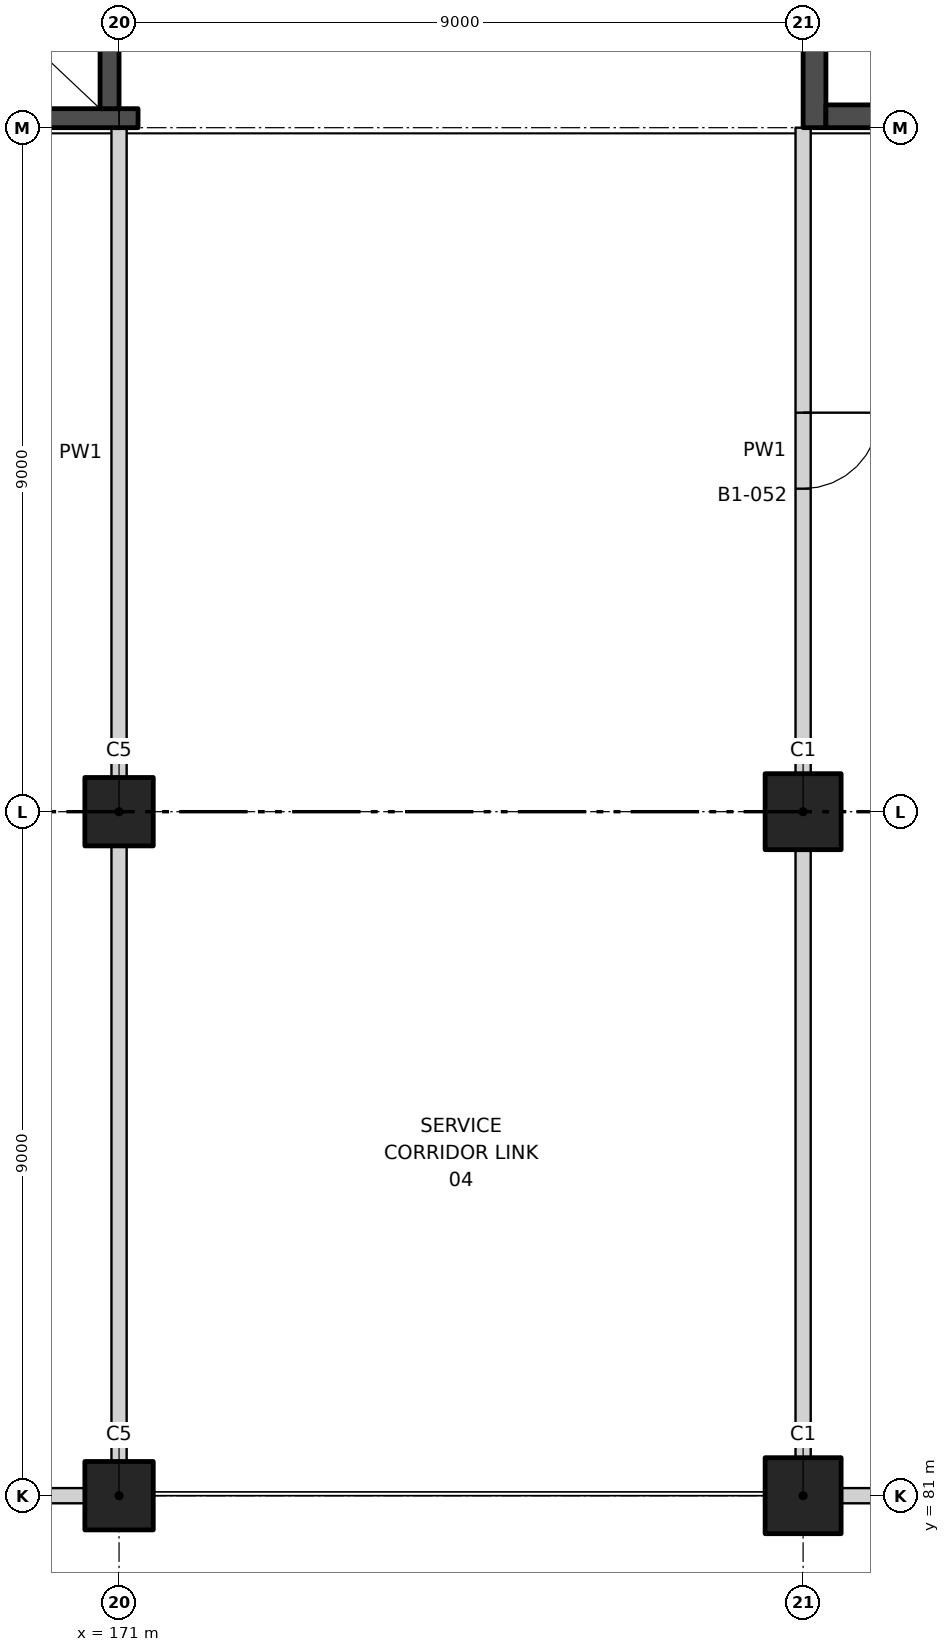
"""IFC4 building model, lengths in metres.
Left out: names, types, materials, properties, quantities, classifications, styles, units other than length and angle.
Written with IfcOpenShell. Run it as: python <this file> out.ifc"""

import sys

from ifc_helpers import new_model, si_unit, direction, frame, frame_2d, origin, origin_2d, place, context, subcontext, project, spatial, rectangle, extrude, element, fill, save


model = new_model("IFC4")
c1 = context("Model", 3, precision=1e-05, world=origin(), true_north=direction((0.0, 1.0)))
c2 = subcontext(c1, "Body", "Model", "MODEL_VIEW")
j1 = project(units=[si_unit("LENGTHUNIT", "METRE"), si_unit("PLANEANGLEUNIT", "RADIAN")], contexts=[c1])
p1 = place(None, origin())
s1 = spatial("IfcSite", under=j1, at=p1, CompositionType="ELEMENT")
p2 = place(p1, origin())
s2 = spatial("IfcBuilding", under=s1, at=p2, CompositionType="ELEMENT")
p3 = place(p2, frame((0.0, 0.0, -6.0)))
s3 = spatial("IfcBuildingStorey", under=s2, at=p3, CompositionType="ELEMENT", Elevation=-6.0)
p4 = place(p3, frame((171.0, 81.0, 0.0), z_axis=(0.0, 0.0, 1.0), x_axis=(1.0, 0.0, 0.0)))
e1 = element("IfcColumn", 1, at=p4, inside=s3, PredefinedType="COLUMN", context=c2, shape_type="SweptSolid", body=[
    extrude(rectangle(XDim=0.9, YDim=0.9, at=origin_2d()), origin(), (0.0, 0.0, 1.0), 6.0),
])
p5 = place(p3, frame((180.0, 81.0, 0.0), z_axis=(0.0, 0.0, 1.0), x_axis=(1.0, 0.0, 0.0)))
e2 = element("IfcColumn", 2, at=p5, inside=s3, PredefinedType="COLUMN", context=c2, shape_type="SweptSolid", body=[
    extrude(rectangle(XDim=1.0, YDim=1.0, at=origin_2d()), origin(), (0.0, 0.0, 1.0), 6.0),
])
p6 = place(p3, frame((171.0, 90.0, 0.0), z_axis=(0.0, 0.0, 1.0), x_axis=(1.0, 0.0, 0.0)))
e3 = element("IfcColumn", 3, at=p6, inside=s3, PredefinedType="COLUMN", context=c2, shape_type="SweptSolid", body=[
    extrude(rectangle(XDim=0.9, YDim=0.9, at=origin_2d()), origin(), (0.0, 0.0, 1.0), 6.0),
])
p7 = place(p3, frame((180.0, 90.0, 0.0), z_axis=(0.0, 0.0, 1.0), x_axis=(1.0, 0.0, 0.0)))
e4 = element("IfcColumn", 4, at=p7, inside=s3, PredefinedType="COLUMN", context=c2, shape_type="SweptSolid", body=[
    extrude(rectangle(XDim=1.0, YDim=1.0, at=origin_2d()), origin(), (0.0, 0.0, 1.0), 6.0),
])
p8 = place(p3, frame((164.25, 81.0, 0.0), z_axis=(0.0, 0.0, 1.0), x_axis=(1.0, 0.0, 0.0)))
e5 = element("IfcWall", 5, at=p8, inside=s3, PredefinedType="PARTITIONING", context=c2, shape_type="SweptSolid", body=[
    extrude(rectangle(XDim=6.3, YDim=0.2, at=frame_2d((3.15, 0.0))), origin(), (0.0, 0.0, 1.0), 4.85),
])
p9 = place(p8, frame((4.25, 0.0, 0.0)))
e6 = element("IfcOpeningElement", 6, at=p9, cuts=e5, PredefinedType="OPENING", context=c2, shape_type="SweptSolid", body=[
    extrude(rectangle(XDim=1.0, YDim=2.1, at=frame_2d((0.5, 1.05))), frame((0.0, 0.11, 0.0), z_axis=(0.0, -1.0, 0.0), x_axis=(1.0, 0.0, 0.0)), (0.0, 0.0, 1.0), 0.22),
])
p10 = place(p3, frame((180.5, 81.0, 0.0), z_axis=(0.0, 0.0, 1.0), x_axis=(1.0, 0.0, 0.0)))
e7 = element("IfcWall", 7, at=p10, inside=s3, PredefinedType="PARTITIONING", context=c2, shape_type="SweptSolid", body=[
    extrude(rectangle(XDim=8.3, YDim=0.2, at=frame_2d((4.15, 0.0))), origin(), (0.0, 0.0, 1.0), 4.65),
])
p11 = place(p3, frame((171.0, 81.45, 0.0), z_axis=(0.0, 0.0, 1.0), x_axis=(0.0, 1.0, 0.0)))
e8 = element("IfcWall", 8, at=p11, inside=s3, PredefinedType="PARTITIONING", context=c2, shape_type="SweptSolid", body=[
    extrude(rectangle(XDim=8.1, YDim=0.2, at=frame_2d((4.05, 0.0))), origin(), (0.0, 0.0, 1.0), 4.65),
])
p12 = place(p3, frame((171.0, 90.45, 0.0), z_axis=(0.0, 0.0, 1.0), x_axis=(0.0, 1.0, 0.0)))
e9 = element("IfcWall", 9, at=p12, inside=s3, PredefinedType="PARTITIONING", context=c2, shape_type="SweptSolid", body=[
    extrude(rectangle(XDim=8.55, YDim=0.2, at=frame_2d((4.275, 0.0))), origin(), (0.0, 0.0, 1.0), 4.55),
])
p13 = place(p3, frame((180.0, 81.5, 0.0), z_axis=(0.0, 0.0, 1.0), x_axis=(0.0, 1.0, 0.0)))
e10 = element("IfcWall", 10, at=p13, inside=s3, PredefinedType="PARTITIONING", context=c2, shape_type="SweptSolid", body=[
    extrude(rectangle(XDim=8.0, YDim=0.2, at=frame_2d((4.0, 0.0))), origin(), (0.0, 0.0, 1.0), 4.65),
])
p14 = place(p3, frame((180.0, 90.5, 0.0), z_axis=(0.0, 0.0, 1.0), x_axis=(0.0, 1.0, 0.0)))
e11 = element("IfcWall", 11, at=p14, inside=s3, PredefinedType="PARTITIONING", context=c2, shape_type="SweptSolid", body=[
    extrude(rectangle(XDim=8.5, YDim=0.2, at=frame_2d((4.25, 0.0))), origin(), (0.0, 0.0, 1.0), 4.55),
])
p15 = place(p14, frame((3.75, 0.0, 0.0)))
e12 = element("IfcOpeningElement", 12, at=p15, cuts=e11, PredefinedType="OPENING", context=c2, shape_type="SweptSolid", body=[
    extrude(rectangle(XDim=1.0, YDim=2.1, at=frame_2d((0.5, 1.05))), frame((0.0, 0.11, 0.0), z_axis=(0.0, -1.0, 0.0), x_axis=(1.0, 0.0, 0.0)), (0.0, 0.0, 1.0), 0.22),
])
p16 = place(p3, frame((180.15, 99.0, 0.0), z_axis=(0.0, 0.0, 1.0), x_axis=(0.0, 1.0, 0.0)))
e13 = element("IfcWall", 13, at=p16, inside=s3, PredefinedType="SHEAR", context=c2, shape_type="SweptSolid", body=[
    extrude(rectangle(XDim=18.0, YDim=0.3, at=frame_2d((9.0, 0.0))), origin(), (0.0, 0.0, 1.0), 6.0),
])
p17 = place(p16, frame((1.5, 0.0, 0.0)))
e14 = element("IfcOpeningElement", 14, at=p17, cuts=e13, PredefinedType="OPENING", context=c2, shape_type="SweptSolid", body=[
    extrude(rectangle(XDim=1.2, YDim=2.1, at=frame_2d((0.6, 1.05))), frame((0.0, 0.16, 0.0), z_axis=(0.0, -1.0, 0.0), x_axis=(1.0, 0.0, 0.0)), (0.0, 0.0, 1.0), 0.32),
])
p18 = place(p3, frame((180.3, 99.15, 0.0), z_axis=(0.0, 0.0, 1.0), x_axis=(1.0, 0.0, 0.0)))
e15 = element("IfcWall", 15, at=p18, inside=s3, PredefinedType="SHEAR", context=c2, shape_type="SweptSolid", body=[
    extrude(rectangle(XDim=8.4, YDim=0.3, at=frame_2d((4.2, 0.0))), origin(), (0.0, 0.0, 1.0), 6.0),
])
p19 = place(p3, frame((162.0, 99.125, -1.0), z_axis=(0.0, 0.0, 1.0), x_axis=(1.0, 0.0, 0.0)))
e16 = element("IfcWall", 16, at=p19, inside=s3, PredefinedType="SHEAR", context=c2, shape_type="SweptSolid", body=[
    extrude(rectangle(XDim=9.25, YDim=0.25, at=frame_2d((4.625, 0.0))), origin(), (0.0, 0.0, 1.0), 7.0),
])
p20 = place(p3, frame((170.875, 99.25, -1.0), z_axis=(0.0, 0.0, 1.0), x_axis=(0.0, 1.0, 0.0)))
e17 = element("IfcWall", 17, at=p20, inside=s3, PredefinedType="SHEAR", context=c2, shape_type="SweptSolid", body=[
    extrude(rectangle(XDim=2.5, YDim=0.25, at=frame_2d((1.25, 0.0))), origin(), (0.0, 0.0, 1.0), 7.0),
])
p21 = place(p15, frame((1.0, 0.0, 0.0), z_axis=(0.0, 0.0, 1.0), x_axis=(-1.0, 0.0, 0.0)))
e18 = element("IfcDoor", 18, at=p21, inside=s3, OperationType="SINGLE_SWING_LEFT", PredefinedType="DOOR", context=c2, shape_type="SweptSolid", body=[
    extrude(rectangle(XDim=1.0, YDim=2.1, at=frame_2d((0.5, 1.05))), frame((0.0, 0.025, 0.0), z_axis=(0.0, -1.0, 0.0), x_axis=(1.0, 0.0, 0.0)), (0.0, 0.0, 1.0), 0.05),
])
fill(e12, e18)
save(model, sys.argv[1])
